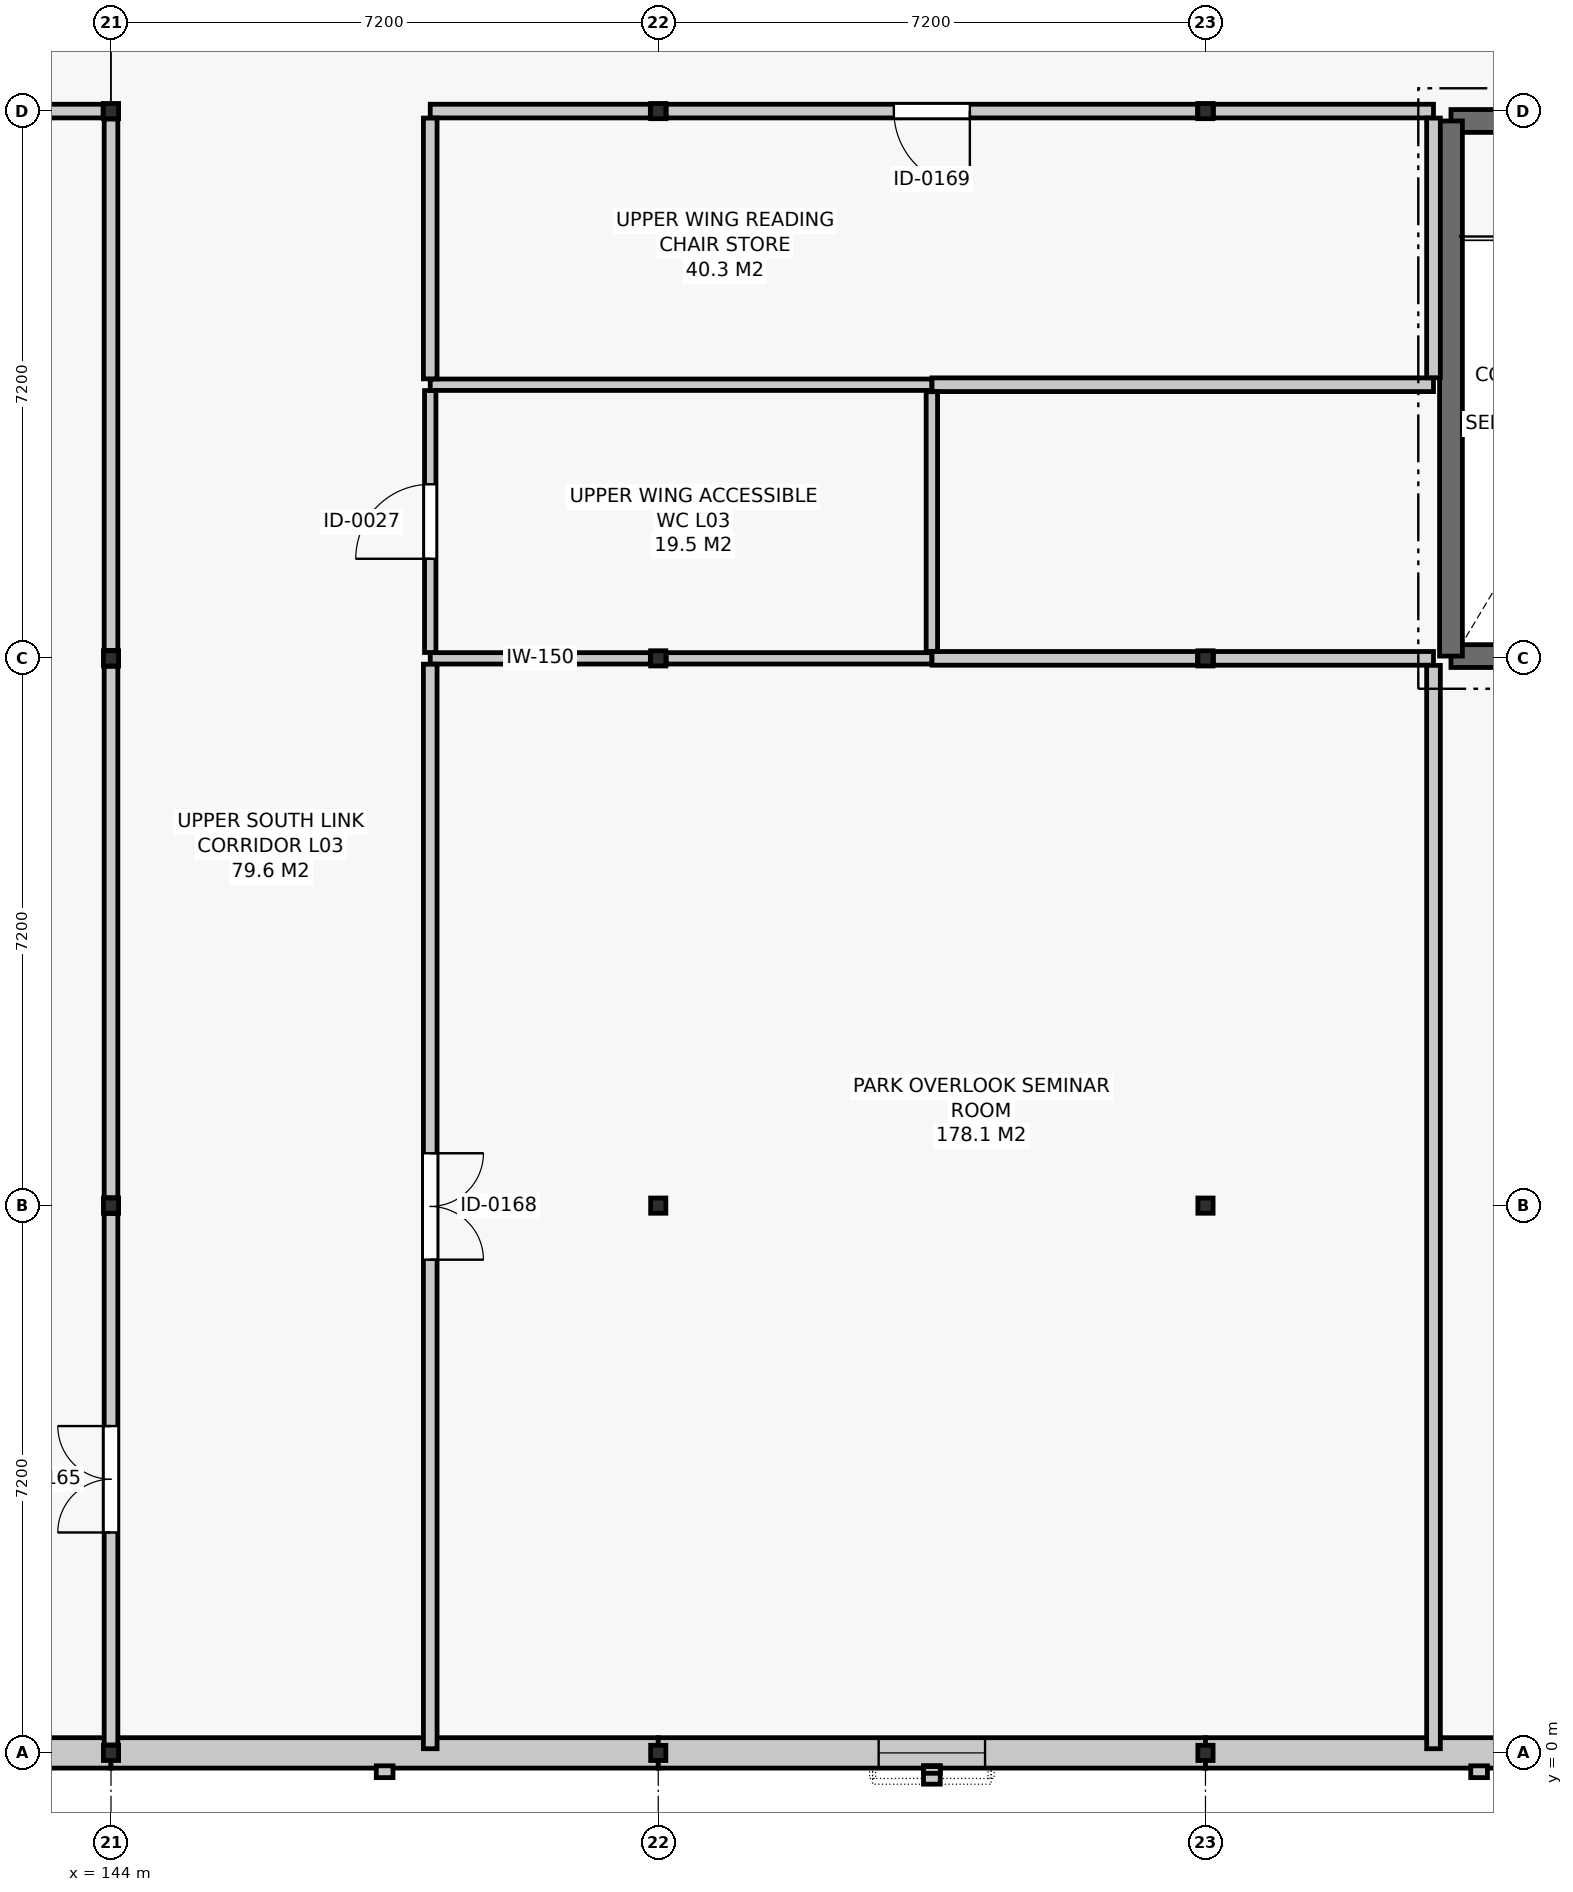
"""IFC4 building model, lengths in metres.
Left out: names, types, materials, properties, quantities, classifications, styles, units other than length and angle.
Written with IfcOpenShell. Run it as: python <this file> out.ifc"""

import sys

from ifc_helpers import new_model, si_unit, direction, frame, frame_2d, origin, origin_2d, place, context, subcontext, project, spatial, rectangle, i_section, extrude, element, fill, save


model = new_model("IFC4")
c1 = context("Model", 3, precision=1e-05, world=origin(), true_north=direction((0.0, 1.0)))
c2 = subcontext(c1, "Body", "Model", "MODEL_VIEW")
j1 = project(units=[si_unit("LENGTHUNIT", "METRE"), si_unit("PLANEANGLEUNIT", "RADIAN")], contexts=[c1])
p1 = place(None, origin())
s1 = spatial("IfcSite", under=j1, at=p1, CompositionType="ELEMENT")
p2 = place(p1, origin())
s2 = spatial("IfcBuilding", under=s1, at=p2, CompositionType="ELEMENT")
p3 = place(p2, frame((0.0, 0.0, 14.4)))
s3 = spatial("IfcBuildingStorey", under=s2, at=p3, CompositionType="ELEMENT", Elevation=14.4)
for number, where, z_axis, x_axis in (
    (1, (144.0, 0.0, 0.0), (0.0, 0.0, 1.0), (1.0, 0.0, 0.0)),
    (2, (144.0, 7.2, 0.0), (0.0, 0.0, 1.0), (1.0, 0.0, 0.0)),
    (3, (144.0, 14.4, 0.0), (0.0, 0.0, 1.0), (1.0, 0.0, 0.0)),
    (4, (144.0, 21.6, 0.0), (0.0, 0.0, 1.0), (1.0, 0.0, 0.0)),
    (5, (151.2, 0.0, 0.0), (0.0, 0.0, 1.0), (1.0, 0.0, 0.0)),
    (6, (151.2, 7.2, 0.0), (0.0, 0.0, 1.0), (1.0, 0.0, 0.0)),
    (7, (151.2, 14.4, 0.0), (0.0, 0.0, 1.0), (1.0, 0.0, 0.0)),
    (8, (151.2, 21.6, 0.0), (0.0, 0.0, 1.0), (1.0, 0.0, 0.0)),
    (9, (158.4, 0.0, 0.0), (0.0, 0.0, 1.0), (1.0, 0.0, 0.0)),
    (10, (158.4, 7.2, 0.0), (0.0, 0.0, 1.0), (1.0, 0.0, 0.0)),
    (11, (158.4, 14.4, 0.0), (0.0, 0.0, 1.0), (1.0, 0.0, 0.0)),
    (12, (158.4, 21.6, 0.0), (0.0, 0.0, 1.0), (1.0, 0.0, 0.0)),
):
    element("IfcColumn", number, at=place(p3, frame(where, z_axis=z_axis, x_axis=x_axis)), inside=s3, PredefinedType="COLUMN", context=c2, shape_type="SweptSolid", body=[
        extrude(i_section(OverallWidth=0.2, OverallDepth=0.2, WebThickness=0.009, FlangeThickness=0.015, FilletRadius=0.018, at=origin_2d()), origin(), (0.0, 0.0, 1.0), 4.2),
    ])
p4 = place(p3, frame((136.8, 0.0, 0.0), z_axis=(0.0, 0.0, 1.0), x_axis=(1.0, 0.0, 0.0)))
e13 = element("IfcWall", 13, at=p4, inside=s3, PredefinedType="SOLIDWALL", context=c2, shape_type="SweptSolid", body=[
    extrude(rectangle(XDim=7.2, YDim=0.4, at=frame_2d((3.6, 0.0))), origin(), (0.0, 0.0, 1.0), 3.24),
])
p5 = place(p4, frame((2.9, 0.0, 0.95)))
e14 = element("IfcOpeningElement", 14, at=p5, cuts=e13, PredefinedType="OPENING", context=c2, shape_type="SweptSolid", body=[
    extrude(rectangle(XDim=1.4, YDim=1.85, at=frame_2d((0.7, 0.925))), frame((0.0, 0.212, 0.0), z_axis=(0.0, -1.0, 0.0), x_axis=(1.0, 0.0, 0.0)), (0.0, 0.0, 1.0), 0.424),
])
p6 = place(p3, frame((144.0, 0.0, 0.0), z_axis=(0.0, 0.0, 1.0), x_axis=(1.0, 0.0, 0.0)))
e15 = element("IfcWall", 15, at=p6, inside=s3, PredefinedType="SOLIDWALL", context=c2, shape_type="SweptSolid", body=[
    extrude(rectangle(XDim=7.2, YDim=0.4, at=frame_2d((3.6, 0.0))), origin(), (0.0, 0.0, 1.0), 3.24),
])
p7 = place(p3, frame((151.2, 0.0, 0.0), z_axis=(0.0, 0.0, 1.0), x_axis=(1.0, 0.0, 0.0)))
e16 = element("IfcWall", 16, at=p7, inside=s3, PredefinedType="SOLIDWALL", context=c2, shape_type="SweptSolid", body=[
    extrude(rectangle(XDim=7.2, YDim=0.4, at=frame_2d((3.6, 0.0))), origin(), (0.0, 0.0, 1.0), 3.24),
])
p8 = place(p7, frame((2.9, 0.0, 0.95)))
e17 = element("IfcOpeningElement", 17, at=p8, cuts=e16, PredefinedType="OPENING", context=c2, shape_type="SweptSolid", body=[
    extrude(rectangle(XDim=1.4, YDim=1.85, at=frame_2d((0.7, 0.925))), frame((0.0, 0.212, 0.0), z_axis=(0.0, -1.0, 0.0), x_axis=(1.0, 0.0, 0.0)), (0.0, 0.0, 1.0), 0.424),
])
p9 = place(p3, frame((158.4, 0.0, 0.0), z_axis=(0.0, 0.0, 1.0), x_axis=(1.0, 0.0, 0.0)))
e18 = element("IfcWall", 18, at=p9, inside=s3, PredefinedType="SOLIDWALL", context=c2, shape_type="SweptSolid", body=[
    extrude(rectangle(XDim=7.096, YDim=0.4, at=frame_2d((3.548, 0.0))), origin(), (0.0, 0.0, 1.0), 3.24),
])
p10 = place(p3, frame((161.63, 14.43, 0.0), z_axis=(0.0, 0.0, 1.0), x_axis=(1.0, 0.0, 0.0)))
e19 = element("IfcWall", 19, at=p10, inside=s3, PredefinedType="SHEAR", context=c2, shape_type="SweptSolid", body=[
    extrude(rectangle(XDim=3.44, YDim=0.3, at=frame_2d((1.72, 0.0))), origin(), (0.0, 0.0, 1.0), 3.96),
])
p11 = place(p3, frame((165.07, 21.47, 0.0), z_axis=(0.0, 0.0, 1.0), x_axis=(-1.0, 0.0, 0.0)))
e20 = element("IfcWall", 20, at=p11, inside=s3, PredefinedType="SHEAR", context=c2, shape_type="SweptSolid", body=[
    extrude(rectangle(XDim=3.44, YDim=0.3, at=frame_2d((1.72, 0.0))), origin(), (0.0, 0.0, 1.0), 3.96),
])
p12 = place(p11, frame((1.17, 0.0, 0.0)))
e21 = element("IfcOpeningElement", 21, at=p12, cuts=e20, PredefinedType="OPENING", context=c2, shape_type="SweptSolid", body=[
    extrude(rectangle(XDim=1.1, YDim=2.15, at=frame_2d((0.55, 1.075))), frame((0.0, 0.162, 0.0), z_axis=(0.0, -1.0, 0.0), x_axis=(1.0, 0.0, 0.0)), (0.0, 0.0, 1.0), 0.324),
])
p13 = place(p3, frame((161.63, 21.47, 0.0), z_axis=(0.0, 0.0, 1.0), x_axis=(0.0, -1.0, 0.0)))
e22 = element("IfcWall", 22, at=p13, inside=s3, PredefinedType="SHEAR", context=c2, shape_type="SweptSolid", body=[
    extrude(rectangle(XDim=7.04, YDim=0.3, at=frame_2d((3.52, 0.0))), origin(), (0.0, 0.0, 1.0), 3.96),
])
p14 = place(p3, frame((148.2, 14.4, 0.0), z_axis=(0.0, 0.0, 1.0), x_axis=(1.0, 0.0, 0.0)))
e23 = element("IfcWall", 23, at=p14, inside=s3, PredefinedType="PARTITIONING", context=c2, shape_type="SweptSolid", body=[
    extrude(rectangle(XDim=2.896, YDim=0.15, at=frame_2d((1.448, 0.0))), origin(), (0.0, 0.0, 1.0), 3.595),
])
p15 = place(p3, frame((151.304, 14.4, 0.0), z_axis=(0.0, 0.0, 1.0), x_axis=(1.0, 0.0, 0.0)))
e24 = element("IfcWall", 24, at=p15, inside=s3, PredefinedType="PARTITIONING", context=c2, shape_type="SweptSolid", body=[
    extrude(rectangle(XDim=3.496, YDim=0.15, at=frame_2d((1.748, 0.0))), origin(), (0.0, 0.0, 1.0), 3.595),
])
p16 = place(p3, frame((148.2, 18.0, 0.0), z_axis=(0.0, 0.0, 1.0), x_axis=(1.0, 0.0, 0.0)))
e25 = element("IfcWall", 25, at=p16, inside=s3, PredefinedType="PARTITIONING", context=c2, shape_type="SweptSolid", body=[
    extrude(rectangle(XDim=6.6, YDim=0.15, at=frame_2d((3.3, 0.0))), origin(), (0.0, 0.0, 1.0), 3.595),
])
p17 = place(p3, frame((136.904, 21.6, 0.0), z_axis=(0.0, 0.0, 1.0), x_axis=(1.0, 0.0, 0.0)))
e26 = element("IfcWall", 26, at=p17, inside=s3, PredefinedType="PARTITIONING", context=c2, shape_type="SweptSolid", body=[
    extrude(rectangle(XDim=6.992, YDim=0.18, at=frame_2d((3.496, 0.0))), origin(), (0.0, 0.0, 1.0), 3.245),
])
p18 = place(p3, frame((154.802, 14.4, 0.0), z_axis=(0.0, 0.0, 1.0), x_axis=(1.0, 0.0, 0.0)))
e27 = element("IfcWall", 27, at=p18, inside=s3, PredefinedType="PARTITIONING", context=c2, shape_type="SweptSolid", body=[
    extrude(rectangle(XDim=3.494, YDim=0.18, at=frame_2d((1.747, 0.0))), origin(), (0.0, 0.0, 1.0), 3.595),
])
p19 = place(p3, frame((158.504, 14.4, 0.0), z_axis=(0.0, 0.0, 1.0), x_axis=(1.0, 0.0, 0.0)))
e28 = element("IfcWall", 28, at=p19, inside=s3, PredefinedType="PARTITIONING", context=c2, shape_type="SweptSolid", body=[
    extrude(rectangle(XDim=2.896, YDim=0.18, at=frame_2d((1.448, 0.0))), origin(), (0.0, 0.0, 1.0), 3.595),
])
p20 = place(p3, frame((154.802, 18.0, 0.0), z_axis=(0.0, 0.0, 1.0), x_axis=(1.0, 0.0, 0.0)))
e29 = element("IfcWall", 29, at=p20, inside=s3, PredefinedType="PARTITIONING", context=c2, shape_type="SweptSolid", body=[
    extrude(rectangle(XDim=6.598, YDim=0.18, at=frame_2d((3.299, 0.0))), origin(), (0.0, 0.0, 1.0), 3.595),
])
p21 = place(p3, frame((148.2, 21.6, 0.0), z_axis=(0.0, 0.0, 1.0), x_axis=(1.0, 0.0, 0.0)))
e30 = element("IfcWall", 30, at=p21, inside=s3, PredefinedType="PARTITIONING", context=c2, shape_type="SweptSolid", body=[
    extrude(rectangle(XDim=2.896, YDim=0.18, at=frame_2d((1.448, 0.0))), origin(), (0.0, 0.0, 1.0), 3.595),
])
p22 = place(p3, frame((151.304, 21.6, 0.0), z_axis=(0.0, 0.0, 1.0), x_axis=(1.0, 0.0, 0.0)))
e31 = element("IfcWall", 31, at=p22, inside=s3, PredefinedType="PARTITIONING", context=c2, shape_type="SweptSolid", body=[
    extrude(rectangle(XDim=6.992, YDim=0.18, at=frame_2d((3.496, 0.0))), origin(), (0.0, 0.0, 1.0), 3.595),
])
p23 = place(p22, frame((2.996, 0.0, 0.0)))
e32 = element("IfcOpeningElement", 32, at=p23, cuts=e31, PredefinedType="OPENING", context=c2, shape_type="SweptSolid", body=[
    extrude(rectangle(XDim=1.0, YDim=2.15, at=frame_2d((0.5, 1.075))), frame((0.0, 0.102, 0.0), z_axis=(0.0, -1.0, 0.0), x_axis=(1.0, 0.0, 0.0)), (0.0, 0.0, 1.0), 0.204),
])
p24 = place(p3, frame((158.504, 21.6, 0.0), z_axis=(0.0, 0.0, 1.0), x_axis=(1.0, 0.0, 0.0)))
e33 = element("IfcWall", 33, at=p24, inside=s3, PredefinedType="PARTITIONING", context=c2, shape_type="SweptSolid", body=[
    extrude(rectangle(XDim=2.896, YDim=0.18, at=frame_2d((1.448, 0.0))), origin(), (0.0, 0.0, 1.0), 3.595),
])
p25 = place(p3, frame((148.2, 14.477, 0.0), z_axis=(0.0, 0.0, 1.0), x_axis=(0.0, 1.0, 0.0)))
e34 = element("IfcWall", 34, at=p25, inside=s3, PredefinedType="PARTITIONING", context=c2, shape_type="SweptSolid", body=[
    extrude(rectangle(XDim=3.446, YDim=0.15, at=frame_2d((1.723, 0.0))), origin(), (0.0, 0.0, 1.0), 3.625),
])
p26 = place(p25, frame((1.233, 0.0, 0.0)))
e35 = element("IfcOpeningElement", 35, at=p26, cuts=e34, PredefinedType="OPENING", context=c2, shape_type="SweptSolid", body=[
    extrude(rectangle(XDim=0.98, YDim=2.1, at=frame_2d((0.49, 1.05))), frame((0.0, 0.087, 0.0), z_axis=(0.0, -1.0, 0.0), x_axis=(1.0, 0.0, 0.0)), (0.0, 0.0, 1.0), 0.174),
])
p27 = place(p3, frame((154.8, 14.492, 0.0), z_axis=(0.0, 0.0, 1.0), x_axis=(0.0, 1.0, 0.0)))
e36 = element("IfcWall", 36, at=p27, inside=s3, PredefinedType="PARTITIONING", context=c2, shape_type="SweptSolid", body=[
    extrude(rectangle(XDim=3.416, YDim=0.15, at=frame_2d((1.708, 0.0))), origin(), (0.0, 0.0, 1.0), 3.625),
])
p28 = place(p3, frame((144.0, 0.104, 0.0), z_axis=(0.0, 0.0, 1.0), x_axis=(0.0, 1.0, 0.0)))
e37 = element("IfcWall", 37, at=p28, inside=s3, PredefinedType="PARTITIONING", context=c2, shape_type="SweptSolid", body=[
    extrude(rectangle(XDim=6.992, YDim=0.18, at=frame_2d((3.496, 0.0))), origin(), (0.0, 0.0, 1.0), 3.595),
])
p29 = place(p28, frame((2.796, 0.0, 0.0)))
e38 = element("IfcOpeningElement", 38, at=p29, cuts=e37, PredefinedType="OPENING", context=c2, shape_type="SweptSolid", body=[
    extrude(rectangle(XDim=1.4, YDim=2.2, at=frame_2d((0.7, 1.1))), frame((0.0, 0.102, 0.0), z_axis=(0.0, -1.0, 0.0), x_axis=(1.0, 0.0, 0.0)), (0.0, 0.0, 1.0), 0.204),
])
p30 = place(p3, frame((144.0, 7.304, 0.0), z_axis=(0.0, 0.0, 1.0), x_axis=(0.0, 1.0, 0.0)))
e39 = element("IfcWall", 39, at=p30, inside=s3, PredefinedType="PARTITIONING", context=c2, shape_type="SweptSolid", body=[
    extrude(rectangle(XDim=6.992, YDim=0.18, at=frame_2d((3.496, 0.0))), origin(), (0.0, 0.0, 1.0), 3.055),
])
p31 = place(p3, frame((144.0, 14.504, 0.0), z_axis=(0.0, 0.0, 1.0), x_axis=(0.0, 1.0, 0.0)))
e40 = element("IfcWall", 40, at=p31, inside=s3, PredefinedType="PARTITIONING", context=c2, shape_type="SweptSolid", body=[
    extrude(rectangle(XDim=6.992, YDim=0.18, at=frame_2d((3.496, 0.0))), origin(), (0.0, 0.0, 1.0), 3.055),
])
p32 = place(p3, frame((148.2, 0.055, 0.0), z_axis=(0.0, 0.0, 1.0), x_axis=(0.0, 1.0, 0.0)))
e41 = element("IfcWall", 41, at=p32, inside=s3, PredefinedType="PARTITIONING", context=c2, shape_type="SweptSolid", body=[
    extrude(rectangle(XDim=14.268, YDim=0.18, at=frame_2d((7.134, 0.0))), origin(), (0.0, 0.0, 1.0), 3.395),
])
p33 = place(p32, frame((6.434, 0.0, 0.0)))
e42 = element("IfcOpeningElement", 42, at=p33, cuts=e41, PredefinedType="OPENING", context=c2, shape_type="SweptSolid", body=[
    extrude(rectangle(XDim=1.4, YDim=2.2, at=frame_2d((0.7, 1.1))), frame((0.0, 0.102, 0.0), z_axis=(0.0, -1.0, 0.0), x_axis=(1.0, 0.0, 0.0)), (0.0, 0.0, 1.0), 0.204),
])
p34 = place(p3, frame((161.4, 0.055, 0.0), z_axis=(0.0, 0.0, 1.0), x_axis=(0.0, 1.0, 0.0)))
e43 = element("IfcWall", 43, at=p34, inside=s3, PredefinedType="PARTITIONING", context=c2, shape_type="SweptSolid", body=[
    extrude(rectangle(XDim=14.253, YDim=0.18, at=frame_2d((7.126, 0.0))), origin(), (0.0, 0.0, 1.0), 3.395),
])
p35 = place(p3, frame((148.2, 18.077, 0.0), z_axis=(0.0, 0.0, 1.0), x_axis=(0.0, 1.0, 0.0)))
e44 = element("IfcWall", 44, at=p35, inside=s3, PredefinedType="PARTITIONING", context=c2, shape_type="SweptSolid", body=[
    extrude(rectangle(XDim=3.431, YDim=0.18, at=frame_2d((1.716, 0.0))), origin(), (0.0, 0.0, 1.0), 3.695),
])
p36 = place(p3, frame((161.4, 18.092, 0.0), z_axis=(0.0, 0.0, 1.0), x_axis=(0.0, 1.0, 0.0)))
e45 = element("IfcWall", 45, at=p36, inside=s3, PredefinedType="PARTITIONING", context=c2, shape_type="SweptSolid", body=[
    extrude(rectangle(XDim=3.416, YDim=0.18, at=frame_2d((1.708, 0.0))), origin(), (0.0, 0.0, 1.0), 3.695),
])
p37 = place(p8, origin())
e46 = element("IfcWindow", 46, at=p37, inside=s3, PartitioningType="SINGLE_PANEL", PredefinedType="WINDOW", context=c2, shape_type="SweptSolid", body=[
    extrude(rectangle(XDim=1.4, YDim=1.85, at=frame_2d((0.7, 0.925))), frame((0.0, 0.03, 0.0), z_axis=(0.0, -1.0, 0.0), x_axis=(1.0, 0.0, 0.0)), (0.0, 0.0, 1.0), 0.06),
])
fill(e17, e46)
p38 = place(p26, origin())
e47 = element("IfcDoor", 47, at=p38, inside=s3, OperationType="SINGLE_SWING_LEFT", PredefinedType="DOOR", context=c2, shape_type="SweptSolid", body=[
    extrude(rectangle(XDim=0.98, YDim=2.1, at=frame_2d((0.49, 1.05))), frame((0.0, 0.025, 0.0), z_axis=(0.0, -1.0, 0.0), x_axis=(1.0, 0.0, 0.0)), (0.0, 0.0, 1.0), 0.05),
])
fill(e35, e47)
p39 = place(p29, origin())
e48 = element("IfcDoor", 48, at=p39, inside=s3, OperationType="DOUBLE_DOOR_SINGLE_SWING", PredefinedType="DOOR", context=c2, shape_type="SweptSolid", body=[
    extrude(rectangle(XDim=1.4, YDim=2.2, at=frame_2d((0.7, 1.1))), frame((0.0, 0.025, 0.0), z_axis=(0.0, -1.0, 0.0), x_axis=(1.0, 0.0, 0.0)), (0.0, 0.0, 1.0), 0.05),
])
fill(e38, e48)
p40 = place(p33, frame((1.4, 0.0, 0.0), z_axis=(0.0, 0.0, 1.0), x_axis=(-1.0, 0.0, 0.0)))
e49 = element("IfcDoor", 49, at=p40, inside=s3, OperationType="DOUBLE_DOOR_SINGLE_SWING", PredefinedType="DOOR", context=c2, shape_type="SweptSolid", body=[
    extrude(rectangle(XDim=1.4, YDim=2.2, at=frame_2d((0.7, 1.1))), frame((0.0, 0.025, 0.0), z_axis=(0.0, -1.0, 0.0), x_axis=(1.0, 0.0, 0.0)), (0.0, 0.0, 1.0), 0.05),
])
fill(e42, e49)
p41 = place(p23, frame((1.0, 0.0, 0.0), z_axis=(0.0, 0.0, 1.0), x_axis=(-1.0, 0.0, 0.0)))
e50 = element("IfcDoor", 50, at=p41, inside=s3, OperationType="SINGLE_SWING_LEFT", PredefinedType="DOOR", context=c2, shape_type="SweptSolid", body=[
    extrude(rectangle(XDim=1.0, YDim=2.15, at=frame_2d((0.5, 1.075))), frame((0.0, 0.025, 0.0), z_axis=(0.0, -1.0, 0.0), x_axis=(1.0, 0.0, 0.0)), (0.0, 0.0, 1.0), 0.05),
])
fill(e32, e50)
save(model, sys.argv[1])
